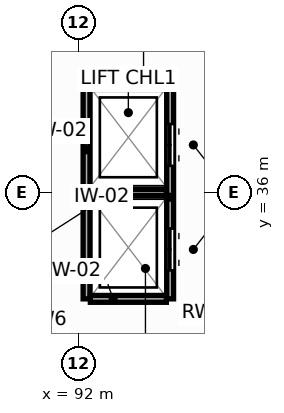
"""IFC4 building model, lengths in metres.
Left out: names, types, materials, properties, quantities, classifications, styles, units other than length and angle.
Written with IfcOpenShell. Run it as: python <this file> out.ifc"""

import sys

from ifc_helpers import new_model, si_unit, direction, frame, frame_2d, origin, place, context, subcontext, project, spatial, rectangle, extrude, element, fill, save


model = new_model("IFC4")
c1 = context("Model", 3, precision=1e-05, world=origin(), true_north=direction((0.0, 1.0)))
c2 = subcontext(c1, "Body", "Model", "MODEL_VIEW")
j1 = project(units=[si_unit("LENGTHUNIT", "METRE"), si_unit("PLANEANGLEUNIT", "RADIAN")], contexts=[c1])
p1 = place(None, origin())
s1 = spatial("IfcSite", under=j1, at=p1, CompositionType="ELEMENT")
p2 = place(p1, origin())
s2 = spatial("IfcBuilding", under=s1, at=p2, CompositionType="ELEMENT")
p3 = place(p2, frame((0.0, 0.0, 14.4)))
s3 = spatial("IfcBuildingStorey", under=s2, at=p3, CompositionType="ELEMENT", Elevation=14.4)
p4 = place(p3, frame((94.4, 33.2, 0.0), z_axis=(0.0, 0.0, 1.0), x_axis=(0.0, 1.0, 0.0)))
e1 = element("IfcWall", 1, at=p4, inside=s3, PredefinedType="PARTITIONING", context=c2, shape_type="SweptSolid", body=[
    extrude(rectangle(XDim=5.6, YDim=0.18, at=frame_2d((2.8, 0.0))), origin(), (0.0, 0.0, 1.0), 4.52),
])
p5 = place(p4, frame((3.5, 0.0, 0.0)))
e2 = element("IfcOpeningElement", 2, at=p5, cuts=e1, PredefinedType="OPENING", context=c2, shape_type="SweptSolid", body=[
    extrude(rectangle(XDim=1.1, YDim=2.1, at=frame_2d((0.55, 1.05))), frame((0.0, 0.1, 0.0), z_axis=(0.0, -1.0, 0.0), x_axis=(1.0, 0.0, 0.0)), (0.0, 0.0, 1.0), 0.2),
])
p6 = place(p4, frame((0.75, 0.0, 0.0)))
e3 = element("IfcOpeningElement", 3, at=p6, cuts=e1, PredefinedType="OPENING", context=c2, shape_type="SweptSolid", body=[
    extrude(rectangle(XDim=1.1, YDim=2.1, at=frame_2d((0.55, 1.05))), frame((0.0, 0.1, 0.0), z_axis=(0.0, -1.0, 0.0), x_axis=(1.0, 0.0, 0.0)), (0.0, 0.0, 1.0), 0.2),
])
p7 = place(p3, frame((92.2, 33.2, 0.0), z_axis=(0.0, 0.0, 1.0), x_axis=(0.0, 1.0, 0.0)))
e4 = element("IfcWall", 4, at=p7, inside=s3, PredefinedType="PARTITIONING", context=c2, shape_type="SweptSolid", body=[
    extrude(rectangle(XDim=5.6, YDim=0.18, at=frame_2d((2.8, 0.0))), origin(), (0.0, 0.0, 1.0), 4.52),
])
for number, where, z_axis, x_axis in (
    (5, (92.3, 38.8, 0.0), (0.0, 0.0, 1.0), (1.0, 0.0, 0.0)),
    (6, (92.3, 33.2, 0.0), (0.0, 0.0, 1.0), (1.0, 0.0, 0.0)),
):
    element("IfcWall", number, at=place(p3, frame(where, z_axis=z_axis, x_axis=x_axis)), inside=s3, PredefinedType="PARTITIONING", context=c2, shape_type="SweptSolid", body=[
        extrude(rectangle(XDim=2.0, YDim=0.18, at=frame_2d((1.0, 0.0))), origin(), (0.0, 0.0, 1.0), 4.52),
    ])
p8 = place(p3, frame((92.3, 36.0, 0.0), z_axis=(0.0, 0.0, 1.0), x_axis=(1.0, 0.0, 0.0)))
e7 = element("IfcWall", 7, at=p8, inside=s3, PredefinedType="PARTITIONING", context=c2, shape_type="SweptSolid", body=[
    extrude(rectangle(XDim=2.0, YDim=0.16, at=frame_2d((1.0, 0.0))), origin(), (0.0, 0.0, 1.0), 4.52),
])
p9 = place(p5, origin())
e8 = element("IfcDoor", 8, at=p9, inside=s3, OperationType="DOUBLE_DOOR_SLIDING", PredefinedType="DOOR", context=c2, shape_type="SweptSolid", body=[
    extrude(rectangle(XDim=1.1, YDim=2.1, at=frame_2d((0.55, 1.05))), frame((0.0, 0.025, 0.0), z_axis=(0.0, -1.0, 0.0), x_axis=(1.0, 0.0, 0.0)), (0.0, 0.0, 1.0), 0.05),
])
fill(e2, e8)
p10 = place(p6, origin())
e9 = element("IfcDoor", 9, at=p10, inside=s3, OperationType="DOUBLE_DOOR_SLIDING", PredefinedType="DOOR", context=c2, shape_type="SweptSolid", body=[
    extrude(rectangle(XDim=1.1, YDim=2.1, at=frame_2d((0.55, 1.05))), frame((0.0, 0.025, 0.0), z_axis=(0.0, -1.0, 0.0), x_axis=(1.0, 0.0, 0.0)), (0.0, 0.0, 1.0), 0.05),
])
fill(e3, e9)
save(model, sys.argv[1])
